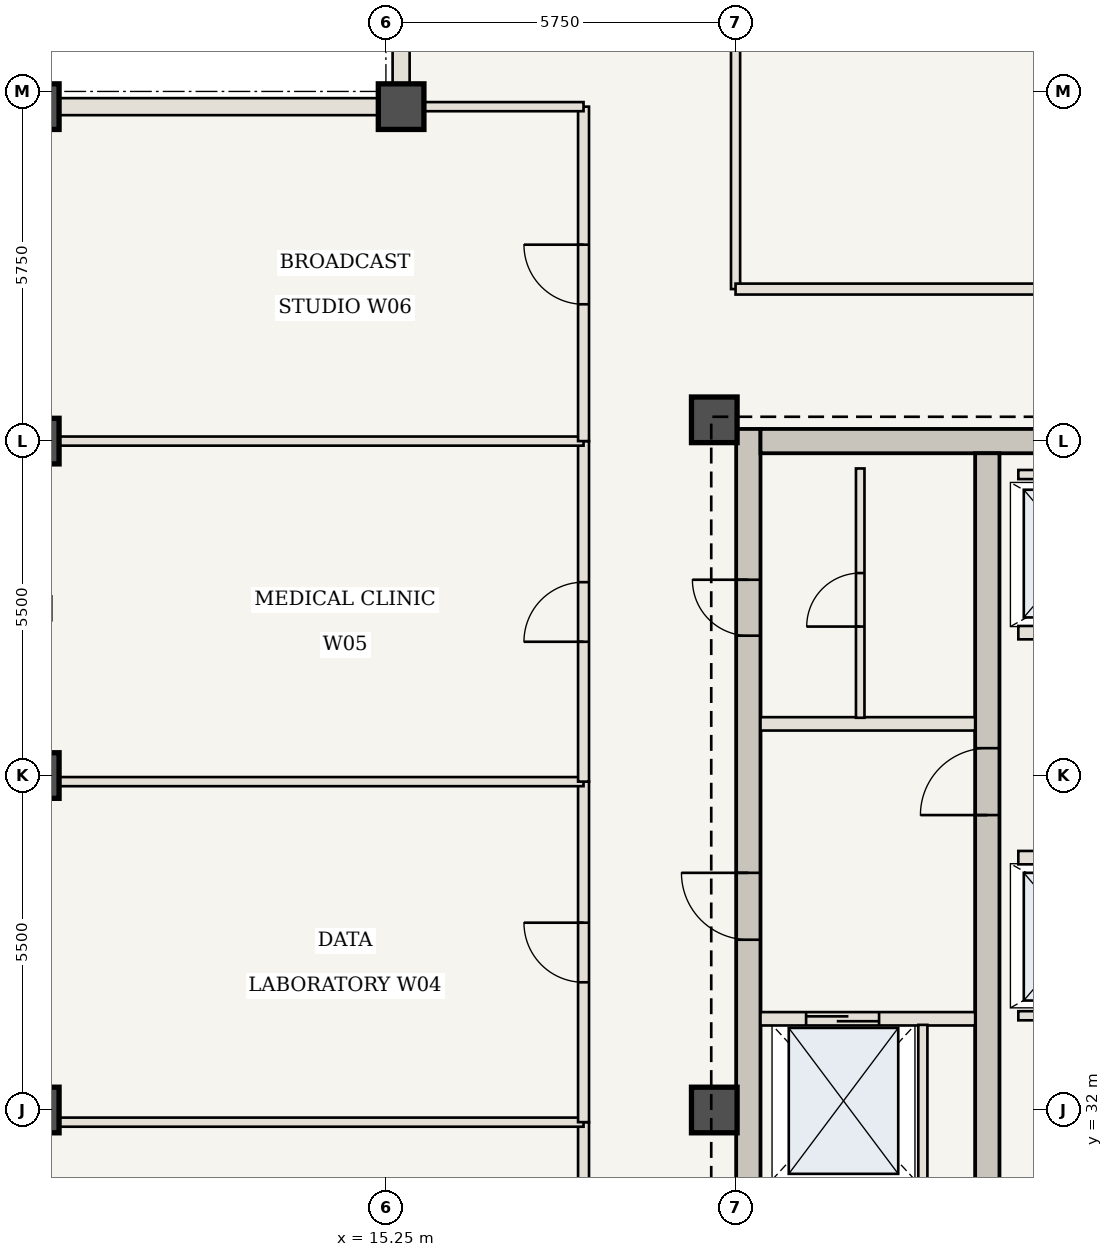
"""IFC4 building model, lengths in metres.
Left out: names, types, materials, properties, quantities, classifications, styles, units other than length and angle.
Written with IfcOpenShell. Run it as: python <this file> out.ifc"""

import sys

from ifc_helpers import new_model, si_unit, direction, frame, frame_2d, origin, origin_2d, place, context, subcontext, project, spatial, rectangle, extrude, element, fill, save


model = new_model("IFC4")
c1 = context("Model", 3, precision=1e-05, world=origin(), true_north=direction((0.0, 1.0)))
c2 = subcontext(c1, "Body", "Model", "MODEL_VIEW")
j1 = project(units=[si_unit("LENGTHUNIT", "METRE"), si_unit("PLANEANGLEUNIT", "RADIAN")], contexts=[c1])
p1 = place(None, origin())
s1 = spatial("IfcSite", under=j1, at=p1, CompositionType="ELEMENT")
p2 = place(p1, origin())
s2 = spatial("IfcBuilding", under=s1, at=p2, CompositionType="ELEMENT")
p3 = place(p2, frame((0.0, 0.0, 300.65)))
s3 = spatial("IfcBuildingStorey", under=s2, at=p3, CompositionType="ELEMENT", Elevation=300.65)
p4 = place(p3, frame((21.21, 30.6, 0.0), z_axis=(0.0, 0.0, 1.0), x_axis=(0.0, 1.0, 0.0)))
e1 = element("IfcWall", 1, at=p4, inside=s3, PredefinedType="SHEAR", context=c2, shape_type="SweptSolid", body=[
    extrude(rectangle(XDim=12.6, YDim=0.4, at=frame_2d((6.3, 0.0))), origin(), (0.0, 0.0, 1.0), 3.85),
])
p5 = place(p4, frame((4.2, 0.0, 0.0)))
e2 = element("IfcOpeningElement", 2, at=p5, cuts=e1, PredefinedType="OPENING", context=c2, shape_type="SweptSolid", body=[
    extrude(rectangle(XDim=1.1, YDim=2.15, at=frame_2d((0.55, 1.075))), frame((0.0, 0.21, 0.0), z_axis=(0.0, -1.0, 0.0), x_axis=(1.0, 0.0, 0.0)), (0.0, 0.0, 1.0), 0.42),
])
p6 = place(p4, frame((9.2, 0.0, 0.0)))
e3 = element("IfcOpeningElement", 3, at=p6, cuts=e1, PredefinedType="OPENING", context=c2, shape_type="SweptSolid", body=[
    extrude(rectangle(XDim=0.92, YDim=2.1, at=frame_2d((0.46, 1.05))), frame((0.0, 0.21, 0.0), z_axis=(0.0, -1.0, 0.0), x_axis=(1.0, 0.0, 0.0)), (0.0, 0.0, 1.0), 0.42),
])
p7 = place(p3, frame((21.41, 43.0, 0.0), z_axis=(0.0, 0.0, 1.0), x_axis=(1.0, 0.0, 0.0)))
e4 = element("IfcWall", 4, at=p7, inside=s3, PredefinedType="SHEAR", context=c2, shape_type="SweptSolid", body=[
    extrude(rectangle(XDim=12.79, YDim=0.4, at=frame_2d((6.395, 0.0))), origin(), (0.0, 0.0, 1.0), 3.85),
])
p8 = place(p3, frame((25.14, 30.6, 0.0), z_axis=(0.0, 0.0, 1.0), x_axis=(0.0, 1.0, 0.0)))
e5 = element("IfcWall", 5, at=p8, inside=s3, PredefinedType="SHEAR", context=c2, shape_type="SweptSolid", body=[
    extrude(rectangle(XDim=12.2, YDim=0.4, at=frame_2d((6.1, 0.0))), origin(), (0.0, 0.0, 1.0), 3.85),
])
p9 = place(p8, frame((6.25, 0.0, 0.0)))
e6 = element("IfcOpeningElement", 6, at=p9, cuts=e5, PredefinedType="OPENING", context=c2, shape_type="SweptSolid", body=[
    extrude(rectangle(XDim=1.1, YDim=2.15, at=frame_2d((0.55, 1.075))), frame((0.0, 0.21, 0.0), z_axis=(0.0, -1.0, 0.0), x_axis=(1.0, 0.0, 0.0)), (0.0, 0.0, 1.0), 0.42),
])
for number, where, z_axis, x_axis in (
    (7, (20.65, 43.35, 0.0), (0.0, 0.0, 1.0), (1.0, 0.0, 0.0)),
    (8, (20.65, 32.0, 0.0), (0.0, 0.0, 1.0), (1.0, 0.0, 0.0)),
    (9, (15.5, 48.5, 0.0), (0.0, 0.0, 1.0), (1.0, 0.0, 0.0)),
    (10, (9.5, 48.5, 0.0), (0.0, 0.0, 1.0), (1.0, 0.0, 0.0)),
    (11, (9.5, 32.0, 0.0), (0.0, 0.0, 1.0), (1.0, 0.0, 0.0)),
    (12, (9.5, 37.5, 0.0), (0.0, 0.0, 1.0), (1.0, 0.0, 0.0)),
    (13, (9.5, 43.0, 0.0), (0.0, 0.0, 1.0), (1.0, 0.0, 0.0)),
):
    element("IfcColumn", number, at=place(p3, frame(where, z_axis=z_axis, x_axis=x_axis)), inside=s3, PredefinedType="COLUMN", context=c2, shape_type="SweptSolid", body=[
        extrude(rectangle(XDim=0.75, YDim=0.75, at=origin_2d()), origin(), (0.0, 0.0, 1.0), 3.85),
    ])
p10 = place(p3, frame((21.41, 33.5, 0.0), z_axis=(0.0, 0.0, 1.0), x_axis=(1.0, 0.0, 0.0)))
e14 = element("IfcWall", 14, at=p10, inside=s3, PredefinedType="STANDARD", context=c2, shape_type="SweptSolid", body=[
    extrude(rectangle(XDim=3.53, YDim=0.22, at=frame_2d((1.765, 0.0))), origin(), (0.0, 0.0, 1.0), 3.685),
])
p11 = place(p10, frame((0.75, 0.0, 0.0)))
e15 = element("IfcOpeningElement", 15, at=p11, cuts=e14, PredefinedType="OPENING", context=c2, shape_type="SweptSolid", body=[
    extrude(rectangle(XDim=1.2, YDim=2.2, at=frame_2d((0.6, 1.1))), frame((0.0, 0.12, 0.0), z_axis=(0.0, -1.0, 0.0), x_axis=(1.0, 0.0, 0.0)), (0.0, 0.0, 1.0), 0.24),
])
p12 = place(p3, frame((24.08, 30.75, 0.0), z_axis=(0.0, 0.0, 1.0), x_axis=(0.0, 1.0, 0.0)))
e16 = element("IfcWall", 16, at=p12, inside=s3, PredefinedType="STANDARD", context=c2, shape_type="SweptSolid", body=[
    extrude(rectangle(XDim=2.65, YDim=0.15, at=frame_2d((1.325, 0.0))), origin(), (0.0, 0.0, 1.0), 3.685),
])
p13 = place(p3, frame((21.41, 38.35, 0.0), z_axis=(0.0, 0.0, 1.0), x_axis=(1.0, 0.0, 0.0)))
e17 = element("IfcWall", 17, at=p13, inside=s3, PredefinedType="STANDARD", context=c2, shape_type="SweptSolid", body=[
    extrude(rectangle(XDim=3.53, YDim=0.22, at=frame_2d((1.765, 0.0))), origin(), (0.0, 0.0, 1.0), 3.685),
])
p14 = place(p3, frame((23.05, 38.45, 0.0), z_axis=(0.0, 0.0, 1.0), x_axis=(0.0, 1.0, 0.0)))
e18 = element("IfcWall", 18, at=p14, inside=s3, PredefinedType="STANDARD", context=c2, shape_type="SweptSolid", body=[
    extrude(rectangle(XDim=4.1, YDim=0.14, at=frame_2d((2.05, 0.0))), origin(), (0.0, 0.0, 1.0), 3.685),
])
p15 = place(p14, frame((1.5, 0.0, 0.0)))
e19 = element("IfcOpeningElement", 19, at=p15, cuts=e18, PredefinedType="OPENING", context=c2, shape_type="SweptSolid", body=[
    extrude(rectangle(XDim=0.88, YDim=2.1, at=frame_2d((0.44, 1.05))), frame((0.0, 0.08, 0.0), z_axis=(0.0, -1.0, 0.0), x_axis=(1.0, 0.0, 0.0)), (0.0, 0.0, 1.0), 0.16),
])
p16 = place(p3, frame((25.65, 36.15, 0.0), z_axis=(0.0, 0.0, 1.0), x_axis=(1.0, 0.0, 0.0)))
e20 = element("IfcWall", 20, at=p16, inside=s3, PredefinedType="STANDARD", context=c2, shape_type="SweptSolid", body=[
    extrude(rectangle(XDim=4.3, YDim=0.22, at=frame_2d((2.15, 0.0))), origin(), (0.0, 0.0, 1.0), 3.685),
])
p17 = place(p16, frame((0.58, 0.0, 0.0)))
e21 = element("IfcOpeningElement", 21, at=p17, cuts=e20, PredefinedType="OPENING", context=c2, shape_type="SweptSolid", body=[
    extrude(rectangle(XDim=1.1, YDim=2.15, at=frame_2d((0.55, 1.075))), frame((0.0, 0.12, 0.0), z_axis=(0.0, -1.0, 0.0), x_axis=(1.0, 0.0, 0.0)), (0.0, 0.0, 1.0), 0.24),
])
p18 = place(p16, frame((2.55, 0.0, 0.0)))
e22 = element("IfcOpeningElement", 22, at=p18, cuts=e20, PredefinedType="OPENING", context=c2, shape_type="SweptSolid", body=[
    extrude(rectangle(XDim=1.1, YDim=2.15, at=frame_2d((0.55, 1.075))), frame((0.0, 0.12, 0.0), z_axis=(0.0, -1.0, 0.0), x_axis=(1.0, 0.0, 0.0)), (0.0, 0.0, 1.0), 0.24),
])
p19 = place(p3, frame((25.65, 33.55, 0.0), z_axis=(0.0, 0.0, 1.0), x_axis=(1.0, 0.0, 0.0)))
e23 = element("IfcWall", 23, at=p19, inside=s3, PredefinedType="STANDARD", context=c2, shape_type="SweptSolid", body=[
    extrude(rectangle(XDim=4.2, YDim=0.15, at=frame_2d((2.1, 0.0))), origin(), (0.0, 0.0, 1.0), 3.685),
])
p20 = place(p3, frame((25.65, 39.85, 0.0), z_axis=(0.0, 0.0, 1.0), x_axis=(1.0, 0.0, 0.0)))
e24 = element("IfcWall", 24, at=p20, inside=s3, PredefinedType="STANDARD", context=c2, shape_type="SweptSolid", body=[
    extrude(rectangle(XDim=4.3, YDim=0.22, at=frame_2d((2.15, 0.0))), origin(), (0.0, 0.0, 1.0), 3.685),
])
p21 = place(p20, frame((0.58, 0.0, 0.0)))
e25 = element("IfcOpeningElement", 25, at=p21, cuts=e24, PredefinedType="OPENING", context=c2, shape_type="SweptSolid", body=[
    extrude(rectangle(XDim=1.1, YDim=2.15, at=frame_2d((0.55, 1.075))), frame((0.0, 0.12, 0.0), z_axis=(0.0, -1.0, 0.0), x_axis=(1.0, 0.0, 0.0)), (0.0, 0.0, 1.0), 0.24),
])
p22 = place(p20, frame((2.55, 0.0, 0.0)))
e26 = element("IfcOpeningElement", 26, at=p22, cuts=e24, PredefinedType="OPENING", context=c2, shape_type="SweptSolid", body=[
    extrude(rectangle(XDim=1.1, YDim=2.15, at=frame_2d((0.55, 1.075))), frame((0.0, 0.12, 0.0), z_axis=(0.0, -1.0, 0.0), x_axis=(1.0, 0.0, 0.0)), (0.0, 0.0, 1.0), 0.24),
])
p23 = place(p3, frame((25.65, 42.45, 0.0), z_axis=(0.0, 0.0, 1.0), x_axis=(1.0, 0.0, 0.0)))
e27 = element("IfcWall", 27, at=p23, inside=s3, PredefinedType="STANDARD", context=c2, shape_type="SweptSolid", body=[
    extrude(rectangle(XDim=4.2, YDim=0.15, at=frame_2d((2.1, 0.0))), origin(), (0.0, 0.0, 1.0), 3.685),
])
p24 = place(p3, frame((21.0, 45.5, 0.0), z_axis=(0.0, 0.0, 1.0), x_axis=(0.0, 1.0, 0.0)))
e28 = element("IfcWall", 28, at=p24, inside=s3, PredefinedType="STANDARD", context=c2, shape_type="SweptSolid", body=[
    extrude(rectangle(XDim=8.94, YDim=0.15, at=frame_2d((4.47, 0.0))), origin(), (0.0, 0.0, 1.0), 3.685),
])
p25 = place(p3, frame((21.0, 45.5, 0.0), z_axis=(0.0, 0.0, 1.0), x_axis=(1.0, 0.0, 0.0)))
e29 = element("IfcWall", 29, at=p25, inside=s3, PredefinedType="STANDARD", context=c2, shape_type="SweptSolid", body=[
    extrude(rectangle(XDim=22.0, YDim=0.18, at=frame_2d((11.0, 0.0))), origin(), (0.0, 0.0, 1.0), 3.685),
])
p26 = place(p25, frame((11.95, 0.0, 0.0)))
e30 = element("IfcOpeningElement", 30, at=p26, cuts=e29, PredefinedType="OPENING", context=c2, shape_type="SweptSolid", body=[
    extrude(rectangle(XDim=0.98, YDim=2.2, at=frame_2d((0.49, 1.1))), frame((0.0, 0.1, 0.0), z_axis=(0.0, -1.0, 0.0), x_axis=(1.0, 0.0, 0.0)), (0.0, 0.0, 1.0), 0.2),
])
p27 = place(p3, frame((18.5, 26.2, 0.0), z_axis=(0.0, 0.0, 1.0), x_axis=(0.0, 1.0, 0.0)))
e31 = element("IfcWall", 31, at=p27, inside=s3, PredefinedType="STANDARD", context=c2, shape_type="SweptSolid", body=[
    extrude(rectangle(XDim=5.6, YDim=0.18, at=frame_2d((2.8, 0.0))), origin(), (0.0, 0.0, 1.0), 3.685),
])
p28 = place(p27, frame((2.3, 0.0, 0.0)))
e32 = element("IfcOpeningElement", 32, at=p28, cuts=e31, PredefinedType="OPENING", context=c2, shape_type="SweptSolid", body=[
    extrude(rectangle(XDim=0.98, YDim=2.2, at=frame_2d((0.49, 1.1))), frame((0.0, 0.1, 0.0), z_axis=(0.0, -1.0, 0.0), x_axis=(1.0, 0.0, 0.0)), (0.0, 0.0, 1.0), 0.2),
])
p29 = place(p3, frame((9.56, 31.8, 0.0), z_axis=(0.0, 0.0, 1.0), x_axis=(1.0, 0.0, 0.0)))
e33 = element("IfcWall", 33, at=p29, inside=s3, PredefinedType="STANDARD", context=c2, shape_type="SweptSolid", body=[
    extrude(rectangle(XDim=8.94, YDim=0.15, at=frame_2d((4.47, 0.0))), origin(), (0.0, 0.0, 1.0), 3.14),
])
p30 = place(p3, frame((18.5, 31.8, 0.0), z_axis=(0.0, 0.0, 1.0), x_axis=(0.0, 1.0, 0.0)))
e34 = element("IfcWall", 34, at=p30, inside=s3, PredefinedType="STANDARD", context=c2, shape_type="SweptSolid", body=[
    extrude(rectangle(XDim=5.6, YDim=0.18, at=frame_2d((2.8, 0.0))), origin(), (0.0, 0.0, 1.0), 3.685),
])
p31 = place(p30, frame((2.3, 0.0, 0.0)))
e35 = element("IfcOpeningElement", 35, at=p31, cuts=e34, PredefinedType="OPENING", context=c2, shape_type="SweptSolid", body=[
    extrude(rectangle(XDim=0.98, YDim=2.2, at=frame_2d((0.49, 1.1))), frame((0.0, 0.1, 0.0), z_axis=(0.0, -1.0, 0.0), x_axis=(1.0, 0.0, 0.0)), (0.0, 0.0, 1.0), 0.2),
])
p32 = place(p3, frame((9.56, 37.4, 0.0), z_axis=(0.0, 0.0, 1.0), x_axis=(1.0, 0.0, 0.0)))
e36 = element("IfcWall", 36, at=p32, inside=s3, PredefinedType="STANDARD", context=c2, shape_type="SweptSolid", body=[
    extrude(rectangle(XDim=8.94, YDim=0.15, at=frame_2d((4.47, 0.0))), origin(), (0.0, 0.0, 1.0), 3.685),
])
p33 = place(p3, frame((18.5, 37.4, 0.0), z_axis=(0.0, 0.0, 1.0), x_axis=(0.0, 1.0, 0.0)))
e37 = element("IfcWall", 37, at=p33, inside=s3, PredefinedType="STANDARD", context=c2, shape_type="SweptSolid", body=[
    extrude(rectangle(XDim=5.6, YDim=0.18, at=frame_2d((2.8, 0.0))), origin(), (0.0, 0.0, 1.0), 3.685),
])
p34 = place(p33, frame((2.3, 0.0, 0.0)))
e38 = element("IfcOpeningElement", 38, at=p34, cuts=e37, PredefinedType="OPENING", context=c2, shape_type="SweptSolid", body=[
    extrude(rectangle(XDim=0.98, YDim=2.2, at=frame_2d((0.49, 1.1))), frame((0.0, 0.1, 0.0), z_axis=(0.0, -1.0, 0.0), x_axis=(1.0, 0.0, 0.0)), (0.0, 0.0, 1.0), 0.2),
])
p35 = place(p3, frame((9.56, 43.0, 0.0), z_axis=(0.0, 0.0, 1.0), x_axis=(1.0, 0.0, 0.0)))
e39 = element("IfcWall", 39, at=p35, inside=s3, PredefinedType="STANDARD", context=c2, shape_type="SweptSolid", body=[
    extrude(rectangle(XDim=8.94, YDim=0.15, at=frame_2d((4.47, 0.0))), origin(), (0.0, 0.0, 1.0), 3.685),
])
p36 = place(p3, frame((18.5, 43.0, 0.0), z_axis=(0.0, 0.0, 1.0), x_axis=(0.0, 1.0, 0.0)))
e40 = element("IfcWall", 40, at=p36, inside=s3, PredefinedType="STANDARD", context=c2, shape_type="SweptSolid", body=[
    extrude(rectangle(XDim=5.5, YDim=0.18, at=frame_2d((2.75, 0.0))), origin(), (0.0, 0.0, 1.0), 3.685),
])
p37 = place(p36, frame((2.25, 0.0, 0.0)))
e41 = element("IfcOpeningElement", 41, at=p37, cuts=e40, PredefinedType="OPENING", context=c2, shape_type="SweptSolid", body=[
    extrude(rectangle(XDim=0.98, YDim=2.2, at=frame_2d((0.49, 1.1))), frame((0.0, 0.1, 0.0), z_axis=(0.0, -1.0, 0.0), x_axis=(1.0, 0.0, 0.0)), (0.0, 0.0, 1.0), 0.2),
])
p38 = place(p3, frame((15.5, 48.5, 0.0), z_axis=(0.0, 0.0, 1.0), x_axis=(1.0, 0.0, 0.0)))
e42 = element("IfcWall", 42, at=p38, inside=s3, PredefinedType="STANDARD", context=c2, shape_type="SweptSolid", body=[
    extrude(rectangle(XDim=3.0, YDim=0.15, at=frame_2d((1.5, 0.0))), origin(), (0.0, 0.0, 1.0), 3.685),
])
for number, where, z_axis, x_axis in (
    (43, (15.5, 48.5, 0.0), (0.0, 0.0, 1.0), (0.0, 1.0, 0.0)),
    (44, (9.5, 48.5, 0.0), (0.0, 0.0, 1.0), (1.0, 0.0, 0.0)),
):
    element("IfcWall", number, at=place(p3, frame(where, z_axis=z_axis, x_axis=x_axis)), inside=s3, PredefinedType="USERDEFINED", context=c2, shape_type="SweptSolid", body=[
        extrude(rectangle(XDim=6.0, YDim=0.28, at=frame_2d((3.0, 0.0))), origin(), (0.0, 0.0, 1.0), 2.985),
    ])
p39 = place(p5, origin())
e45 = element("IfcDoor", 45, at=p39, inside=s3, OperationType="SINGLE_SWING_RIGHT", PredefinedType="DOOR", context=c2, shape_type="SweptSolid", body=[
    extrude(rectangle(XDim=1.1, YDim=2.15, at=frame_2d((0.55, 1.075))), frame((0.0, 0.025, 0.0), z_axis=(0.0, -1.0, 0.0), x_axis=(1.0, 0.0, 0.0)), (0.0, 0.0, 1.0), 0.05),
])
fill(e2, e45)
p40 = place(p9, origin())
e46 = element("IfcDoor", 46, at=p40, inside=s3, OperationType="SINGLE_SWING_LEFT", PredefinedType="DOOR", context=c2, shape_type="SweptSolid", body=[
    extrude(rectangle(XDim=1.1, YDim=2.15, at=frame_2d((0.55, 1.075))), frame((0.0, 0.025, 0.0), z_axis=(0.0, -1.0, 0.0), x_axis=(1.0, 0.0, 0.0)), (0.0, 0.0, 1.0), 0.05),
])
fill(e6, e46)
p41 = place(p6, origin())
e47 = element("IfcDoor", 47, at=p41, inside=s3, OperationType="SINGLE_SWING_RIGHT", PredefinedType="DOOR", context=c2, shape_type="SweptSolid", body=[
    extrude(rectangle(XDim=0.92, YDim=2.1, at=frame_2d((0.46, 1.05))), frame((0.0, 0.025, 0.0), z_axis=(0.0, -1.0, 0.0), x_axis=(1.0, 0.0, 0.0)), (0.0, 0.0, 1.0), 0.05),
])
fill(e3, e47)
p42 = place(p11, origin())
e48 = element("IfcDoor", 48, at=p42, inside=s3, OperationType="DOUBLE_DOOR_SLIDING", PredefinedType="DOOR", context=c2, shape_type="SweptSolid", body=[
    extrude(rectangle(XDim=1.2, YDim=2.2, at=frame_2d((0.6, 1.1))), frame((0.0, 0.025, 0.0), z_axis=(0.0, -1.0, 0.0), x_axis=(1.0, 0.0, 0.0)), (0.0, 0.0, 1.0), 0.05),
])
fill(e15, e48)
p43 = place(p15, origin())
e49 = element("IfcDoor", 49, at=p43, inside=s3, OperationType="SINGLE_SWING_LEFT", PredefinedType="DOOR", context=c2, shape_type="SweptSolid", body=[
    extrude(rectangle(XDim=0.88, YDim=2.1, at=frame_2d((0.44, 1.05))), frame((0.0, 0.025, 0.0), z_axis=(0.0, -1.0, 0.0), x_axis=(1.0, 0.0, 0.0)), (0.0, 0.0, 1.0), 0.05),
])
fill(e19, e49)
p44 = place(p31, origin())
e50 = element("IfcDoor", 50, at=p44, inside=s3, OperationType="SINGLE_SWING_RIGHT", PredefinedType="DOOR", context=c2, shape_type="SweptSolid", body=[
    extrude(rectangle(XDim=0.98, YDim=2.2, at=frame_2d((0.49, 1.1))), frame((0.0, 0.025, 0.0), z_axis=(0.0, -1.0, 0.0), x_axis=(1.0, 0.0, 0.0)), (0.0, 0.0, 1.0), 0.05),
])
fill(e35, e50)
p45 = place(p34, origin())
e51 = element("IfcDoor", 51, at=p45, inside=s3, OperationType="SINGLE_SWING_LEFT", PredefinedType="DOOR", context=c2, shape_type="SweptSolid", body=[
    extrude(rectangle(XDim=0.98, YDim=2.2, at=frame_2d((0.49, 1.1))), frame((0.0, 0.025, 0.0), z_axis=(0.0, -1.0, 0.0), x_axis=(1.0, 0.0, 0.0)), (0.0, 0.0, 1.0), 0.05),
])
fill(e38, e51)
p46 = place(p37, origin())
e52 = element("IfcDoor", 52, at=p46, inside=s3, OperationType="SINGLE_SWING_RIGHT", PredefinedType="DOOR", context=c2, shape_type="SweptSolid", body=[
    extrude(rectangle(XDim=0.98, YDim=2.2, at=frame_2d((0.49, 1.1))), frame((0.0, 0.025, 0.0), z_axis=(0.0, -1.0, 0.0), x_axis=(1.0, 0.0, 0.0)), (0.0, 0.0, 1.0), 0.05),
])
fill(e41, e52)
save(model, sys.argv[1])
